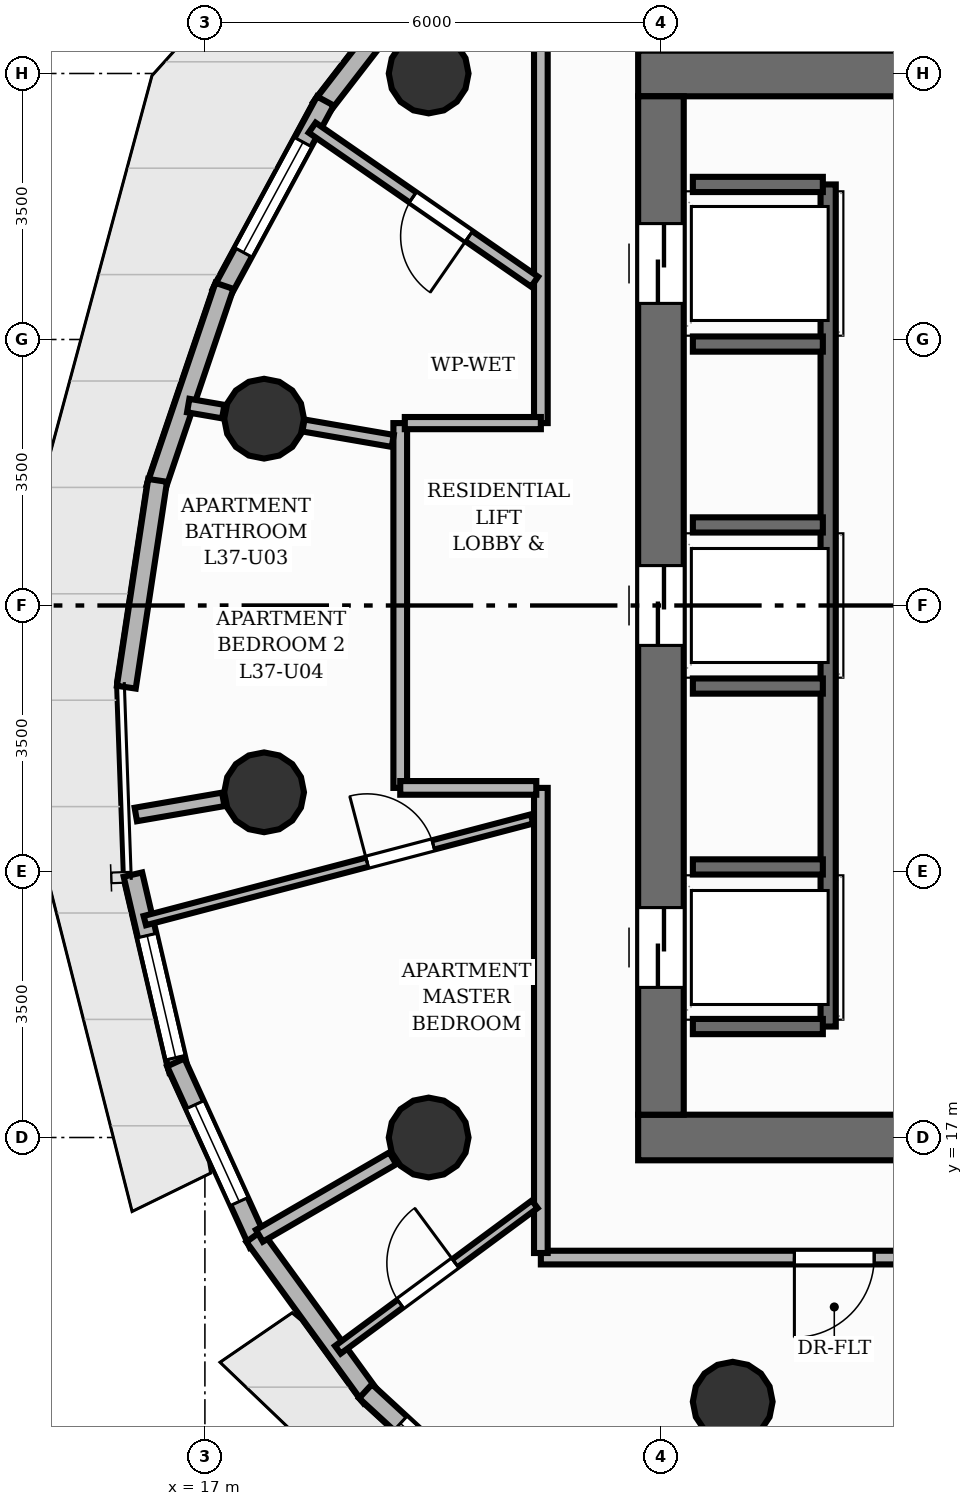
"""IFC4 building model, lengths in metres.
Left out: names, types, materials, properties, quantities, classifications, styles, units other than length and angle.
Written with IfcOpenShell. Run it as: python <this file> out.ifc"""

import sys

from ifc_helpers import new_model, si_unit, direction, frame, frame_2d, origin, origin_2d, place, context, subcontext, project, spatial, rectangle, circle, extrude, element, fill, save


model = new_model("IFC4")
c1 = context("Model", 3, precision=1e-05, world=origin(), true_north=direction((0.0, 1.0)))
c2 = subcontext(c1, "Body", "Model", "MODEL_VIEW")
j1 = project(units=[si_unit("LENGTHUNIT", "METRE"), si_unit("PLANEANGLEUNIT", "RADIAN")], contexts=[c1])
p1 = place(None, origin())
s1 = spatial("IfcSite", under=j1, at=p1, CompositionType="ELEMENT")
p2 = place(p1, origin())
s2 = spatial("IfcBuilding", under=s1, at=p2, CompositionType="ELEMENT")
p3 = place(p2, frame((0.0, 0.0, 126.56)))
s3 = spatial("IfcBuildingStorey", under=s2, at=p3, CompositionType="ELEMENT", Elevation=126.56)
p4 = place(p3, frame((22.7, 17.0, 0.0), z_axis=(0.0, 0.0, 1.0), x_axis=(1.0, 0.0, 0.0)))
e1 = element("IfcWall", 1, at=p4, inside=s3, PredefinedType="SHEAR", context=c2, shape_type="SweptSolid", body=[
    extrude(rectangle(XDim=15.1, YDim=0.6, at=frame_2d((7.55, 0.0))), origin(), (0.0, 0.0, 1.0), 3.2),
])
p5 = place(p4, frame((5.8, 0.0, 0.0)))
e2 = element("IfcOpeningElement", 2, at=p5, cuts=e1, PredefinedType="OPENING", context=c2, shape_type="SweptSolid", body=[
    extrude(rectangle(XDim=1.1, YDim=2.15, at=frame_2d((0.55, 1.075))), frame((0.0, 0.31, 0.0), z_axis=(0.0, -1.0, 0.0), x_axis=(1.0, 0.0, 0.0)), (0.0, 0.0, 1.0), 0.62),
])
p6 = place(p4, frame((9.35, 0.0, 0.0)))
e3 = element("IfcOpeningElement", 3, at=p6, cuts=e1, PredefinedType="OPENING", context=c2, shape_type="SweptSolid", body=[
    extrude(rectangle(XDim=0.9, YDim=2.1, at=frame_2d((0.45, 1.05))), frame((0.0, 0.31, 0.0), z_axis=(0.0, -1.0, 0.0), x_axis=(1.0, 0.0, 0.0)), (0.0, 0.0, 1.0), 0.62),
])
p7 = place(p3, frame((22.7, 31.0, 0.0), z_axis=(0.0, 0.0, 1.0), x_axis=(1.0, 0.0, 0.0)))
e4 = element("IfcWall", 4, at=p7, inside=s3, PredefinedType="SHEAR", context=c2, shape_type="SweptSolid", body=[
    extrude(rectangle(XDim=15.1, YDim=0.6, at=frame_2d((7.55, 0.0))), origin(), (0.0, 0.0, 1.0), 3.2),
])
p8 = place(p7, frame((11.7, 0.0, 0.0)))
e5 = element("IfcOpeningElement", 5, at=p8, cuts=e4, PredefinedType="OPENING", context=c2, shape_type="SweptSolid", body=[
    extrude(rectangle(XDim=1.1, YDim=2.15, at=frame_2d((0.55, 1.075))), frame((0.0, 0.31, 0.0), z_axis=(0.0, -1.0, 0.0), x_axis=(1.0, 0.0, 0.0)), (0.0, 0.0, 1.0), 0.62),
])
p9 = place(p3, frame((23.0, 17.3, 0.0), z_axis=(0.0, 0.0, 1.0), x_axis=(0.0, 1.0, 0.0)))
e6 = element("IfcWall", 6, at=p9, inside=s3, PredefinedType="SHEAR", context=c2, shape_type="SweptSolid", body=[
    extrude(rectangle(XDim=13.4, YDim=0.6, at=frame_2d((6.7, 0.0))), origin(), (0.0, 0.0, 1.0), 3.2),
])
p10 = place(p9, frame((1.675, 0.0, 0.0)))
e7 = element("IfcOpeningElement", 7, at=p10, cuts=e6, PredefinedType="OPENING", context=c2, shape_type="SweptSolid", body=[
    extrude(rectangle(XDim=1.05, YDim=2.15, at=frame_2d((0.525, 1.075))), frame((0.0, 0.31, 0.0), z_axis=(0.0, -1.0, 0.0), x_axis=(1.0, 0.0, 0.0)), (0.0, 0.0, 1.0), 0.62),
])
p11 = place(p9, frame((6.175, 0.0, 0.0)))
e8 = element("IfcOpeningElement", 8, at=p11, cuts=e6, PredefinedType="OPENING", context=c2, shape_type="SweptSolid", body=[
    extrude(rectangle(XDim=1.05, YDim=2.15, at=frame_2d((0.525, 1.075))), frame((0.0, 0.31, 0.0), z_axis=(0.0, -1.0, 0.0), x_axis=(1.0, 0.0, 0.0)), (0.0, 0.0, 1.0), 0.62),
])
p12 = place(p9, frame((10.675, 0.0, 0.0)))
e9 = element("IfcOpeningElement", 9, at=p12, cuts=e6, PredefinedType="OPENING", context=c2, shape_type="SweptSolid", body=[
    extrude(rectangle(XDim=1.05, YDim=2.15, at=frame_2d((0.525, 1.075))), frame((0.0, 0.31, 0.0), z_axis=(0.0, -1.0, 0.0), x_axis=(1.0, 0.0, 0.0)), (0.0, 0.0, 1.0), 0.62),
])
for number, where, z_axis, x_axis in (
    (10, (19.944, 31.0, 0.0), (0.0, 0.0, 1.0), (1.0, 0.0, 0.0)),
    (11, (17.779, 26.458, 0.0), (0.0, 0.0, 1.0), (1.0, 0.0, 0.0)),
    (12, (17.779, 21.542, 0.0), (0.0, 0.0, 1.0), (1.0, 0.0, 0.0)),
    (13, (19.944, 17.0, 0.0), (0.0, 0.0, 1.0), (1.0, 0.0, 0.0)),
    (14, (23.944, 13.523, 0.0), (0.0, 0.0, 1.0), (1.0, 0.0, 0.0)),
):
    element("IfcColumn", number, at=place(p3, frame(where, z_axis=z_axis, x_axis=x_axis)), inside=s3, PredefinedType="COLUMN", context=c2, shape_type="SweptSolid", body=[
        extrude(circle(Radius=0.525, at=origin_2d()), origin(), (0.0, 0.0, 1.0), 3.2),
    ])
p13 = place(p3, frame((18.525, 30.546, 0.0), z_axis=(0.0, 0.0, 1.0), x_axis=(0.611416743811, 0.791308767415, 0.0)))
e15 = element("IfcWall", 15, at=p13, inside=s3, PredefinedType="SOLIDWALL", context=c2, shape_type="SweptSolid", body=[
    extrude(rectangle(XDim=2.937, YDim=0.25, at=frame_2d((1.468, 0.0))), origin(), (0.0, 0.0, 1.0), 2.96),
])
p14 = place(p3, frame((17.213, 28.104, 0.0), z_axis=(0.0, 0.0, 1.0), x_axis=(0.476018404115, 0.879435318226, 0.0)))
e16 = element("IfcWall", 16, at=p14, inside=s3, PredefinedType="SOLIDWALL", context=c2, shape_type="SweptSolid", body=[
    extrude(rectangle(XDim=2.882, YDim=0.25, at=frame_2d((1.441, 0.0))), origin(), (0.0, 0.0, 1.0), 2.96),
])
p15 = place(p14, frame((0.616, 0.0, 0.85)))
e17 = element("IfcOpeningElement", 17, at=p15, cuts=e16, PredefinedType="OPENING", context=c2, shape_type="SweptSolid", body=[
    extrude(rectangle(XDim=1.65, YDim=1.55, at=frame_2d((0.825, 0.775))), frame((0.0, 0.135, 0.0), z_axis=(0.0, -1.0, 0.0), x_axis=(1.0, 0.0, 0.0)), (0.0, 0.0, 1.0), 0.27),
])
p16 = place(p3, frame((16.351, 25.538, 0.0), z_axis=(0.0, 0.0, 1.0), x_axis=(0.321473951892, 0.946918422175, 0.0)))
e18 = element("IfcWall", 18, at=p16, inside=s3, PredefinedType="SOLIDWALL", context=c2, shape_type="SweptSolid", body=[
    extrude(rectangle(XDim=2.818, YDim=0.25, at=frame_2d((1.409, 0.0))), origin(), (0.0, 0.0, 1.0), 2.96),
])
p17 = place(p3, frame((15.966, 22.925, 0.0), z_axis=(0.0, 0.0, 1.0), x_axis=(0.149576734229, 0.988750120393, 0.0)))
e19 = element("IfcWall", 19, at=p17, inside=s3, PredefinedType="SOLIDWALL", context=c2, shape_type="SweptSolid", body=[
    extrude(rectangle(XDim=2.752, YDim=0.25, at=frame_2d((1.376, 0.0))), origin(), (0.0, 0.0, 1.0), 2.96),
])
p18 = place(p3, frame((16.654, 17.88, 0.0), z_axis=(0.0, 0.0, 1.0), x_axis=(-0.226865331245, 0.973926137589, 0.0)))
e20 = element("IfcWall", 20, at=p18, inside=s3, PredefinedType="SOLIDWALL", context=c2, shape_type="SweptSolid", body=[
    extrude(rectangle(XDim=2.648, YDim=0.25, at=frame_2d((1.324, 0.0))), origin(), (0.0, 0.0, 1.0), 2.96),
])
p19 = place(p18, frame((0.175, 0.0, 0.85)))
e21 = element("IfcOpeningElement", 21, at=p19, cuts=e20, PredefinedType="OPENING", context=c2, shape_type="SweptSolid", body=[
    extrude(rectangle(XDim=1.65, YDim=1.55, at=frame_2d((0.825, 0.775))), frame((0.0, 0.135, 0.0), z_axis=(0.0, -1.0, 0.0), x_axis=(1.0, 0.0, 0.0)), (0.0, 0.0, 1.0), 0.27),
])
p20 = place(p3, frame((17.705, 15.6, 0.0), z_axis=(0.0, 0.0, 1.0), x_axis=(-0.41458087789, 0.910012470073, 0.0)))
e22 = element("IfcWall", 22, at=p20, inside=s3, PredefinedType="SOLIDWALL", context=c2, shape_type="SweptSolid", body=[
    extrude(rectangle(XDim=2.624, YDim=0.25, at=frame_2d((1.312, 0.0))), origin(), (0.0, 0.0, 1.0), 2.96),
])
p21 = place(p20, frame((0.612, 0.0, 0.85)))
e23 = element("IfcOpeningElement", 23, at=p21, cuts=e22, PredefinedType="OPENING", context=c2, shape_type="SweptSolid", body=[
    extrude(rectangle(XDim=1.4, YDim=1.55, at=frame_2d((0.7, 0.775))), frame((0.0, 0.135, 0.0), z_axis=(0.0, -1.0, 0.0), x_axis=(1.0, 0.0, 0.0)), (0.0, 0.0, 1.0), 0.27),
])
p22 = place(p3, frame((19.189, 13.576, 0.0), z_axis=(0.0, 0.0, 1.0), x_axis=(-0.587574137145, 0.80917033643, 0.0)))
e24 = element("IfcWall", 24, at=p22, inside=s3, PredefinedType="SOLIDWALL", context=c2, shape_type="SweptSolid", body=[
    extrude(rectangle(XDim=2.624, YDim=0.25, at=frame_2d((1.312, 0.0))), origin(), (0.0, 0.0, 1.0), 2.96),
])
p23 = place(p3, frame((21.061, 11.868, 0.0), z_axis=(0.0, 0.0, 1.0), x_axis=(-0.73572884951, 0.677276206579, 0.0)))
e25 = element("IfcWall", 25, at=p23, inside=s3, PredefinedType="SOLIDWALL", context=c2, shape_type="SweptSolid", body=[
    extrude(rectangle(XDim=2.648, YDim=0.25, at=frame_2d((1.324, 0.0))), origin(), (0.0, 0.0, 1.0), 2.96),
])
p24 = place(p23, frame((0.624, 0.0, 0.85)))
e26 = element("IfcOpeningElement", 26, at=p24, cuts=e25, PredefinedType="OPENING", context=c2, shape_type="SweptSolid", body=[
    extrude(rectangle(XDim=1.4, YDim=1.55, at=frame_2d((0.7, 0.775))), frame((0.0, 0.135, 0.0), z_axis=(0.0, -1.0, 0.0), x_axis=(1.0, 0.0, 0.0)), (0.0, 0.0, 1.0), 0.27),
])
p25 = place(p3, frame((25.2, 18.46, 0.0), z_axis=(0.0, 0.0, 1.0), x_axis=(0.0, 1.0, 0.0)))
e27 = element("IfcWall", 27, at=p25, inside=s3, PredefinedType="SHEAR", context=c2, shape_type="SweptSolid", body=[
    extrude(rectangle(XDim=11.08, YDim=0.2, at=frame_2d((5.54, 0.0))), origin(), (0.0, 0.0, 1.0), 3.2),
])
for number, where, z_axis, x_axis in (
    (28, (23.42, 18.46, 0.0), (0.0, 0.0, 1.0), (1.0, 0.0, 0.0)),
    (29, (23.42, 29.54, 0.0), (0.0, 0.0, 1.0), (1.0, 0.0, 0.0)),
    (30, (23.42, 20.56, 0.0), (0.0, 0.0, 1.0), (1.0, 0.0, 0.0)),
    (31, (23.42, 22.94, 0.0), (0.0, 0.0, 1.0), (1.0, 0.0, 0.0)),
    (32, (23.42, 25.06, 0.0), (0.0, 0.0, 1.0), (1.0, 0.0, 0.0)),
    (33, (23.42, 27.44, 0.0), (0.0, 0.0, 1.0), (1.0, 0.0, 0.0)),
):
    element("IfcWall", number, at=place(p3, frame(where, z_axis=z_axis, x_axis=x_axis)), inside=s3, PredefinedType="SHEAR", context=c2, shape_type="SweptSolid", body=[
        extrude(rectangle(XDim=1.71, YDim=0.2, at=frame_2d((0.855, 0.0))), origin(), (0.0, 0.0, 1.0), 3.2),
    ])
p26 = place(p3, frame((17.242, 26.551, 0.0), z_axis=(0.0, 0.0, 1.0), x_axis=(-0.985345448397, 0.170570651999, 0.0)))
e34 = element("IfcWall", 34, at=p26, inside=s3, PredefinedType="PARTITIONING", context=c2, shape_type="SweptSolid", body=[
    extrude(rectangle(XDim=0.468, YDim=0.18, at=frame_2d((0.234, 0.0))), origin(), (0.0, 0.0, 1.0), 2.336),
])
p27 = place(p3, frame((17.242, 21.449, 0.0), z_axis=(0.0, 0.0, 1.0), x_axis=(-0.98537549431, -0.170396992969, 0.0)))
e35 = element("IfcWall", 35, at=p27, inside=s3, PredefinedType="PARTITIONING", context=c2, shape_type="SweptSolid", body=[
    extrude(rectangle(XDim=1.168, YDim=0.18, at=frame_2d((0.584, 0.0))), origin(), (0.0, 0.0, 1.0), 2.336),
])
p28 = place(p3, frame((19.472, 16.726, 0.0), z_axis=(0.0, 0.0, 1.0), x_axis=(-0.86481084581, -0.502097800203, 0.0)))
e36 = element("IfcWall", 36, at=p28, inside=s3, PredefinedType="PARTITIONING", context=c2, shape_type="SweptSolid", body=[
    extrude(rectangle(XDim=2.03, YDim=0.18, at=frame_2d((1.015, 0.0))), origin(), (0.0, 0.0, 1.0), 2.336),
])
p29 = place(p3, frame((21.42, 26.4, 0.0), z_axis=(0.0, 0.0, 1.0), x_axis=(0.0, 1.0, 0.0)))
e37 = element("IfcWall", 37, at=p29, inside=s3, PredefinedType="PARTITIONING", context=c2, shape_type="SweptSolid", body=[
    extrude(rectangle(XDim=6.12, YDim=0.18, at=frame_2d((3.06, 0.0))), origin(), (0.0, 0.0, 1.0), 2.955),
])
p30 = place(p3, frame((19.57, 21.6, 0.0), z_axis=(0.0, 0.0, 1.0), x_axis=(0.0, 1.0, 0.0)))
e38 = element("IfcWall", 38, at=p30, inside=s3, PredefinedType="PARTITIONING", context=c2, shape_type="SweptSolid", body=[
    extrude(rectangle(XDim=4.8, YDim=0.18, at=frame_2d((2.4, 0.0))), origin(), (0.0, 0.0, 1.0), 2.955),
])
p31 = place(p3, frame((19.63, 26.4, 0.0), z_axis=(0.0, 0.0, 1.0), x_axis=(1.0, 0.0, 0.0)))
e39 = element("IfcWall", 39, at=p31, inside=s3, PredefinedType="PLUMBINGWALL", context=c2, shape_type="SweptSolid", body=[
    extrude(rectangle(XDim=1.79, YDim=0.16, at=frame_2d((0.895, 0.0))), origin(), (0.0, 0.0, 1.0), 2.955),
])
p32 = place(p3, frame((29.141, 15.42, 0.0), z_axis=(0.0, 0.0, 1.0), x_axis=(-1.0, 0.0, 0.0)))
e40 = element("IfcWall", 40, at=p32, inside=s3, PredefinedType="PARTITIONING", context=c2, shape_type="SweptSolid", body=[
    extrude(rectangle(XDim=7.721, YDim=0.18, at=frame_2d((3.861, 0.0))), origin(), (0.0, 0.0, 1.0), 2.955),
])
p33 = place(p32, frame((3.336, 0.0, 0.0)))
e41 = element("IfcOpeningElement", 41, at=p33, cuts=e40, PredefinedType="OPENING", context=c2, shape_type="SweptSolid", body=[
    extrude(rectangle(XDim=1.05, YDim=2.15, at=frame_2d((0.525, 1.075))), frame((0.0, 0.1, 0.0), z_axis=(0.0, -1.0, 0.0), x_axis=(1.0, 0.0, 0.0)), (0.0, 0.0, 1.0), 0.2),
])
p34 = place(p3, frame((21.42, 15.48, 0.0), z_axis=(0.0, 0.0, 1.0), x_axis=(0.0, 1.0, 0.0)))
e42 = element("IfcWall", 42, at=p34, inside=s3, PredefinedType="PARTITIONING", context=c2, shape_type="SweptSolid", body=[
    extrude(rectangle(XDim=6.12, YDim=0.18, at=frame_2d((3.06, 0.0))), origin(), (0.0, 0.0, 1.0), 2.955),
])
p35 = place(p3, frame((21.36, 21.6, 0.0), z_axis=(0.0, 0.0, 1.0), x_axis=(-1.0, 0.0, 0.0)))
e43 = element("IfcWall", 43, at=p35, inside=s3, PredefinedType="PARTITIONING", context=c2, shape_type="SweptSolid", body=[
    extrude(rectangle(XDim=1.79, YDim=0.18, at=frame_2d((0.895, 0.0))), origin(), (0.0, 0.0, 1.0), 2.336),
])
p36 = place(p3, frame((21.338, 28.26, 0.0), z_axis=(0.0, 0.0, 1.0), x_axis=(-0.822095882312, 0.569349067168, 0.0)))
e44 = element("IfcWall", 44, at=p36, inside=s3, PredefinedType="PLUMBINGWALL", context=c2, shape_type="SweptSolid", body=[
    extrude(rectangle(XDim=3.56, YDim=0.16, at=frame_2d((1.78, 0.0))), origin(), (0.0, 0.0, 1.0), 2.692),
])
p37 = place(p36, frame((1.05, 0.0, 0.0)))
e45 = element("IfcOpeningElement", 45, at=p37, cuts=e44, PredefinedType="OPENING", context=c2, shape_type="SweptSolid", body=[
    extrude(rectangle(XDim=0.9, YDim=2.1, at=frame_2d((0.45, 1.05))), frame((0.0, 0.09, 0.0), z_axis=(0.0, -1.0, 0.0), x_axis=(1.0, 0.0, 0.0)), (0.0, 0.0, 1.0), 0.18),
])
p38 = place(p3, frame((19.471, 26.166, 0.0), z_axis=(0.0, 0.0, 1.0), x_axis=(-0.985385550807, 0.170338827815, 0.0)))
e46 = element("IfcWall", 46, at=p38, inside=s3, PredefinedType="PLUMBINGWALL", context=c2, shape_type="SweptSolid", body=[
    extrude(rectangle(XDim=1.192, YDim=0.16, at=frame_2d((0.596, 0.0))), origin(), (0.0, 0.0, 1.0), 2.336),
])
p39 = place(p3, frame((29.068, 15.335, 0.0), z_axis=(0.0, 0.0, 1.0), x_axis=(-0.534879638081, -0.844928264864, 0.0)))
e47 = element("IfcWall", 47, at=p39, inside=s3, PredefinedType="PLUMBINGWALL", context=c2, shape_type="SweptSolid", body=[
    extrude(rectangle(XDim=6.669, YDim=0.16, at=frame_2d((3.335, 0.0))), origin(), (0.0, 0.0, 1.0), 2.692),
])
p40 = place(p39, frame((2.885, 0.0, 0.0)))
e48 = element("IfcOpeningElement", 48, at=p40, cuts=e47, PredefinedType="OPENING", context=c2, shape_type="SweptSolid", body=[
    extrude(rectangle(XDim=0.9, YDim=2.1, at=frame_2d((0.45, 1.05))), frame((0.0, 0.09, 0.0), z_axis=(0.0, -1.0, 0.0), x_axis=(1.0, 0.0, 0.0)), (0.0, 0.0, 1.0), 0.18),
])
p41 = place(p3, frame((18.749, 14.207, 0.0), z_axis=(0.0, 0.0, 1.0), x_axis=(0.804182442208, 0.594382536456, 0.0)))
e49 = element("IfcWall", 49, at=p41, inside=s3, PredefinedType="PARTITIONING", context=c2, shape_type="SweptSolid", body=[
    extrude(rectangle(XDim=3.221, YDim=0.125, at=frame_2d((1.611, 0.0))), origin(), (0.0, 0.0, 1.0), 2.955),
])
p42 = place(p41, frame((1.021, 0.0, 0.0)))
e50 = element("IfcOpeningElement", 50, at=p42, cuts=e49, PredefinedType="OPENING", context=c2, shape_type="SweptSolid", body=[
    extrude(rectangle(XDim=0.9, YDim=2.1, at=frame_2d((0.45, 1.05))), frame((0.0, 0.073, 0.0), z_axis=(0.0, -1.0, 0.0), x_axis=(1.0, 0.0, 0.0)), (0.0, 0.0, 1.0), 0.145),
])
p43 = place(p3, frame((16.209, 19.854, 0.0), z_axis=(0.0, 0.0, 1.0), x_axis=(0.967214885104, 0.253959378707, 0.0)))
e51 = element("IfcWall", 51, at=p43, inside=s3, PredefinedType="PARTITIONING", context=c2, shape_type="SweptSolid", body=[
    extrude(rectangle(XDim=5.267, YDim=0.125, at=frame_2d((2.634, 0.0))), origin(), (0.0, 0.0, 1.0), 2.955),
])
p44 = place(p43, frame((3.024, 0.0, 0.0)))
e52 = element("IfcOpeningElement", 52, at=p44, cuts=e51, PredefinedType="OPENING", context=c2, shape_type="SweptSolid", body=[
    extrude(rectangle(XDim=0.9, YDim=2.1, at=frame_2d((0.45, 1.05))), frame((0.0, 0.073, 0.0), z_axis=(0.0, -1.0, 0.0), x_axis=(1.0, 0.0, 0.0)), (0.0, 0.0, 1.0), 0.145),
])
p45 = place(p15, origin())
e53 = element("IfcWindow", 53, at=p45, inside=s3, PartitioningType="SINGLE_PANEL", PredefinedType="WINDOW", context=c2, shape_type="SweptSolid", body=[
    extrude(rectangle(XDim=1.65, YDim=1.55, at=frame_2d((0.825, 0.775))), frame((0.0, 0.03, 0.0), z_axis=(0.0, -1.0, 0.0), x_axis=(1.0, 0.0, 0.0)), (0.0, 0.0, 1.0), 0.06),
])
fill(e17, e53)
p46 = place(p19, origin())
e54 = element("IfcWindow", 54, at=p46, inside=s3, PartitioningType="SINGLE_PANEL", PredefinedType="WINDOW", context=c2, shape_type="SweptSolid", body=[
    extrude(rectangle(XDim=1.65, YDim=1.55, at=frame_2d((0.825, 0.775))), frame((0.0, 0.03, 0.0), z_axis=(0.0, -1.0, 0.0), x_axis=(1.0, 0.0, 0.0)), (0.0, 0.0, 1.0), 0.06),
])
fill(e21, e54)
p47 = place(p21, origin())
e55 = element("IfcWindow", 55, at=p47, inside=s3, PartitioningType="SINGLE_PANEL", PredefinedType="WINDOW", context=c2, shape_type="SweptSolid", body=[
    extrude(rectangle(XDim=1.4, YDim=1.55, at=frame_2d((0.7, 0.775))), frame((0.0, 0.03, 0.0), z_axis=(0.0, -1.0, 0.0), x_axis=(1.0, 0.0, 0.0)), (0.0, 0.0, 1.0), 0.06),
])
fill(e23, e55)
p48 = place(p24, origin())
e56 = element("IfcWindow", 56, at=p48, inside=s3, PartitioningType="SINGLE_PANEL", PredefinedType="WINDOW", context=c2, shape_type="SweptSolid", body=[
    extrude(rectangle(XDim=1.4, YDim=1.55, at=frame_2d((0.7, 0.775))), frame((0.0, 0.03, 0.0), z_axis=(0.0, -1.0, 0.0), x_axis=(1.0, 0.0, 0.0)), (0.0, 0.0, 1.0), 0.06),
])
fill(e26, e56)
p49 = place(p10, origin())
e57 = element("IfcDoor", 57, at=p49, inside=s3, OperationType="DOUBLE_DOOR_SLIDING", PredefinedType="DOOR", context=c2, shape_type="SweptSolid", body=[
    extrude(rectangle(XDim=1.05, YDim=2.15, at=frame_2d((0.525, 1.075))), frame((0.0, 0.025, 0.0), z_axis=(0.0, -1.0, 0.0), x_axis=(1.0, 0.0, 0.0)), (0.0, 0.0, 1.0), 0.05),
])
fill(e7, e57)
p50 = place(p11, origin())
e58 = element("IfcDoor", 58, at=p50, inside=s3, OperationType="DOUBLE_DOOR_SLIDING", PredefinedType="DOOR", context=c2, shape_type="SweptSolid", body=[
    extrude(rectangle(XDim=1.05, YDim=2.15, at=frame_2d((0.525, 1.075))), frame((0.0, 0.025, 0.0), z_axis=(0.0, -1.0, 0.0), x_axis=(1.0, 0.0, 0.0)), (0.0, 0.0, 1.0), 0.05),
])
fill(e8, e58)
p51 = place(p12, origin())
e59 = element("IfcDoor", 59, at=p51, inside=s3, OperationType="DOUBLE_DOOR_SLIDING", PredefinedType="DOOR", context=c2, shape_type="SweptSolid", body=[
    extrude(rectangle(XDim=1.05, YDim=2.15, at=frame_2d((0.525, 1.075))), frame((0.0, 0.025, 0.0), z_axis=(0.0, -1.0, 0.0), x_axis=(1.0, 0.0, 0.0)), (0.0, 0.0, 1.0), 0.05),
])
fill(e9, e59)
p52 = place(p37, origin())
e60 = element("IfcDoor", 60, at=p52, inside=s3, OperationType="SINGLE_SWING_LEFT", PredefinedType="DOOR", context=c2, shape_type="SweptSolid", body=[
    extrude(rectangle(XDim=0.9, YDim=2.1, at=frame_2d((0.45, 1.05))), frame((0.0, 0.025, 0.0), z_axis=(0.0, -1.0, 0.0), x_axis=(1.0, 0.0, 0.0)), (0.0, 0.0, 1.0), 0.05),
])
fill(e45, e60)
p53 = place(p33, origin())
e61 = element("IfcDoor", 61, at=p53, inside=s3, OperationType="SINGLE_SWING_RIGHT", PredefinedType="DOOR", context=c2, shape_type="SweptSolid", body=[
    extrude(rectangle(XDim=1.05, YDim=2.15, at=frame_2d((0.525, 1.075))), frame((0.0, 0.025, 0.0), z_axis=(0.0, -1.0, 0.0), x_axis=(1.0, 0.0, 0.0)), (0.0, 0.0, 1.0), 0.05),
])
fill(e41, e61)
p54 = place(p42, origin())
e62 = element("IfcDoor", 62, at=p54, inside=s3, OperationType="SINGLE_SWING_RIGHT", PredefinedType="DOOR", context=c2, shape_type="SweptSolid", body=[
    extrude(rectangle(XDim=0.9, YDim=2.1, at=frame_2d((0.45, 1.05))), frame((0.0, 0.025, 0.0), z_axis=(0.0, -1.0, 0.0), x_axis=(1.0, 0.0, 0.0)), (0.0, 0.0, 1.0), 0.05),
])
fill(e50, e62)
p55 = place(p44, origin())
e63 = element("IfcDoor", 63, at=p55, inside=s3, OperationType="SINGLE_SWING_LEFT", PredefinedType="DOOR", context=c2, shape_type="SweptSolid", body=[
    extrude(rectangle(XDim=0.9, YDim=2.1, at=frame_2d((0.45, 1.05))), frame((0.0, 0.025, 0.0), z_axis=(0.0, -1.0, 0.0), x_axis=(1.0, 0.0, 0.0)), (0.0, 0.0, 1.0), 0.05),
])
fill(e52, e63)
save(model, sys.argv[1])
